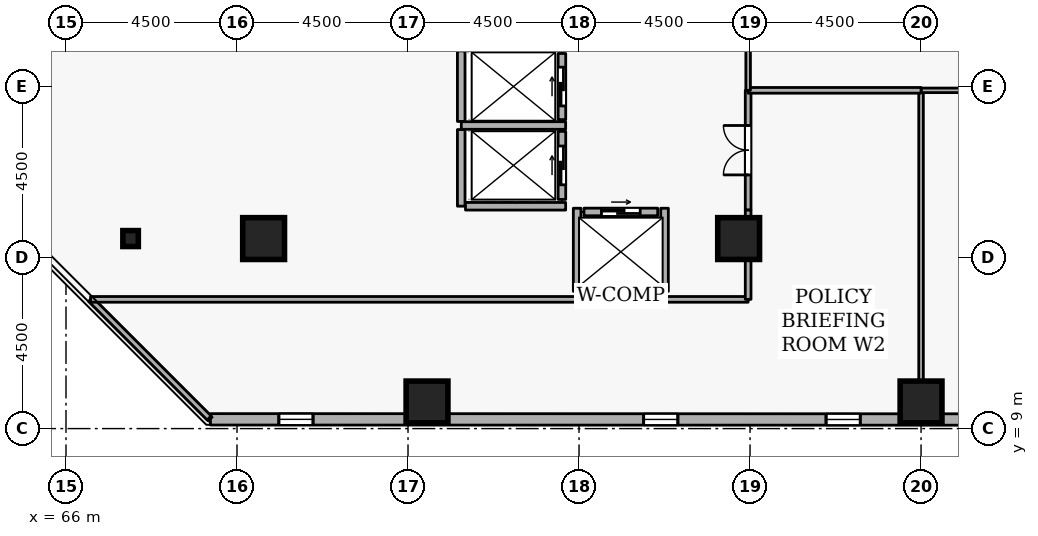
"""IFC4 building model, lengths in metres.
Left out: names, types, materials, properties, quantities, classifications, styles, units other than length and angle.
Written with IfcOpenShell. Run it as: python <this file> out.ifc"""

import sys

from ifc_helpers import new_model, si_unit, direction, frame, frame_2d, origin, origin_2d, place, context, subcontext, project, spatial, rectangle, i_section, extrude, element, fill, save


model = new_model("IFC4")
c1 = context("Model", 3, precision=1e-05, world=origin(), true_north=direction((0.0, 1.0)))
c2 = subcontext(c1, "Body", "Model", "MODEL_VIEW")
j1 = project(units=[si_unit("LENGTHUNIT", "METRE"), si_unit("PLANEANGLEUNIT", "RADIAN")], contexts=[c1])
p1 = place(None, origin())
s1 = spatial("IfcSite", under=j1, at=p1, CompositionType="ELEMENT")
p2 = place(p1, origin())
s2 = spatial("IfcBuilding", under=s1, at=p2, CompositionType="ELEMENT")
p3 = place(p2, frame((0.0, 0.0, 189.3)))
s3 = spatial("IfcBuildingStorey", under=s2, at=p3, CompositionType="ELEMENT", Elevation=189.3)
for number, where, z_axis, x_axis in (
    (1, (71.2, 14.0, 0.0), (0.0, 0.0, 1.0), (1.0, 0.0, 0.0)),
    (2, (88.5, 9.7, 0.0), (0.0, 0.0, 1.0), (1.0, 0.0, 0.0)),
    (3, (75.5, 9.7, 0.0), (0.0, 0.0, 1.0), (1.0, 0.0, 0.0)),
    (4, (83.7, 14.0, 0.0), (0.0, 0.0, 1.0), (1.0, 0.0, 0.0)),
):
    element("IfcColumn", number, at=place(p3, frame(where, z_axis=z_axis, x_axis=x_axis)), inside=s3, PredefinedType="COLUMN", context=c2, shape_type="SweptSolid", body=[
        extrude(rectangle(XDim=1.1, YDim=1.1, at=origin_2d()), origin(), (0.0, 0.0, 1.0), 3.6),
    ])
p4 = place(p3, frame((67.7, 14.0, 0.0), z_axis=(0.0, 0.0, 1.0), x_axis=(1.0, 0.0, 0.0)))
e5 = element("IfcColumn", 5, at=p4, inside=s3, PredefinedType="COLUMN", context=c2, shape_type="SweptSolid", body=[
    extrude(i_section(OverallWidth=0.407, OverallDepth=0.419, WebThickness=0.031, FlangeThickness=0.049, FilletRadius=0.015, at=origin_2d()), origin(), (0.0, 0.0, 1.0), 3.6),
])
p5 = place(p3, frame((69.801, 9.244, 0.0), z_axis=(0.0, 0.0, 1.0), x_axis=(0.999999969988, -0.000244999128, 0.0)))
e6 = element("IfcWall", 6, at=p5, inside=s3, PredefinedType="STANDARD", context=c2, shape_type="SweptSolid", body=[
    extrude(rectangle(XDim=33.881, YDim=0.3, at=frame_2d((16.94, 0.0))), origin(), (0.0, 0.0, 1.0), 2.7),
])
p6 = place(p5, frame((1.8, 0.0, 0.72)))
e7 = element("IfcOpeningElement", 7, at=p6, cuts=e6, PredefinedType="OPENING", context=c2, shape_type="SweptSolid", body=[
    extrude(rectangle(XDim=0.9, YDim=1.75, at=frame_2d((0.45, 0.875))), frame((0.0, 0.16, 0.0), z_axis=(0.0, -1.0, 0.0), x_axis=(1.0, 0.0, 0.0)), (0.0, 0.0, 1.0), 0.32),
])
p7 = place(p5, frame((11.4, 0.0, 0.72)))
e8 = element("IfcOpeningElement", 8, at=p7, cuts=e6, PredefinedType="OPENING", context=c2, shape_type="SweptSolid", body=[
    extrude(rectangle(XDim=0.9, YDim=1.75, at=frame_2d((0.45, 0.875))), frame((0.0, 0.16, 0.0), z_axis=(0.0, -1.0, 0.0), x_axis=(1.0, 0.0, 0.0)), (0.0, 0.0, 1.0), 0.32),
])
p8 = place(p5, frame((16.2, 0.0, 0.72)))
e9 = element("IfcOpeningElement", 9, at=p8, cuts=e6, PredefinedType="OPENING", context=c2, shape_type="SweptSolid", body=[
    extrude(rectangle(XDim=0.9, YDim=1.75, at=frame_2d((0.45, 0.875))), frame((0.0, 0.16, 0.0), z_axis=(0.0, -1.0, 0.0), x_axis=(1.0, 0.0, 0.0)), (0.0, 0.0, 1.0), 0.32),
])
p9 = place(p5, frame((21.0, 0.0, 0.72)))
e10 = element("IfcOpeningElement", 10, at=p9, cuts=e6, PredefinedType="OPENING", context=c2, shape_type="SweptSolid", body=[
    extrude(rectangle(XDim=0.9, YDim=1.75, at=frame_2d((0.45, 0.875))), frame((0.0, 0.16, 0.0), z_axis=(0.0, -1.0, 0.0), x_axis=(1.0, 0.0, 0.0)), (0.0, 0.0, 1.0), 0.32),
])
p10 = place(p5, frame((25.8, 0.0, 0.72)))
e11 = element("IfcOpeningElement", 11, at=p10, cuts=e6, PredefinedType="OPENING", context=c2, shape_type="SweptSolid", body=[
    extrude(rectangle(XDim=0.9, YDim=1.75, at=frame_2d((0.45, 0.875))), frame((0.0, 0.16, 0.0), z_axis=(0.0, -1.0, 0.0), x_axis=(1.0, 0.0, 0.0)), (0.0, 0.0, 1.0), 0.32),
])
p11 = place(p3, frame((79.05, 17.13, 0.0), z_axis=(0.0, 0.0, 1.0), x_axis=(0.0, 1.0, 0.0)))
e12 = element("IfcWall", 12, at=p11, inside=s3, PredefinedType="STANDARD", context=c2, shape_type="SweptSolid", body=[
    extrude(rectangle(XDim=1.74, YDim=0.2, at=frame_2d((0.87, 0.0))), origin(), (0.0, 0.0, 1.0), 3.34),
])
p12 = place(p11, frame((0.36, 0.0, 0.0)))
e13 = element("IfcOpeningElement", 13, at=p12, cuts=e12, PredefinedType="OPENING", context=c2, shape_type="SweptSolid", body=[
    extrude(rectangle(XDim=1.02, YDim=2.06, at=frame_2d((0.51, 1.03))), frame((0.0, 0.11, 0.0), z_axis=(0.0, -1.0, 0.0), x_axis=(1.0, 0.0, 0.0)), (0.0, 0.0, 1.0), 0.22),
])
p13 = place(p3, frame((79.05, 15.03, 0.0), z_axis=(0.0, 0.0, 1.0), x_axis=(0.0, 1.0, 0.0)))
e14 = element("IfcWall", 14, at=p13, inside=s3, PredefinedType="STANDARD", context=c2, shape_type="SweptSolid", body=[
    extrude(rectangle(XDim=1.79, YDim=0.2, at=frame_2d((0.895, 0.0))), origin(), (0.0, 0.0, 1.0), 3.34),
])
p14 = place(p13, frame((0.385, 0.0, 0.0)))
e15 = element("IfcOpeningElement", 15, at=p14, cuts=e14, PredefinedType="OPENING", context=c2, shape_type="SweptSolid", body=[
    extrude(rectangle(XDim=1.02, YDim=2.06, at=frame_2d((0.51, 1.03))), frame((0.0, 0.11, 0.0), z_axis=(0.0, -1.0, 0.0), x_axis=(1.0, 0.0, 0.0)), (0.0, 0.0, 1.0), 0.22),
])
p15 = place(p3, frame((79.63, 14.7, 0.0), z_axis=(0.0, 0.0, 1.0), x_axis=(1.0, 0.0, 0.0)))
e16 = element("IfcWall", 16, at=p15, inside=s3, PredefinedType="STANDARD", context=c2, shape_type="SweptSolid", body=[
    extrude(rectangle(XDim=1.94, YDim=0.2, at=frame_2d((0.97, 0.0))), origin(), (0.0, 0.0, 1.0), 3.34),
])
p16 = place(p15, frame((0.46, 0.0, 0.0)))
e17 = element("IfcOpeningElement", 17, at=p16, cuts=e16, PredefinedType="OPENING", context=c2, shape_type="SweptSolid", body=[
    extrude(rectangle(XDim=1.02, YDim=2.06, at=frame_2d((0.51, 1.03))), frame((0.0, 0.11, 0.0), z_axis=(0.0, -1.0, 0.0), x_axis=(1.0, 0.0, 0.0)), (0.0, 0.0, 1.0), 0.22),
])
p17 = place(p3, frame((76.402, 16.975, 0.0), z_axis=(0.0, 0.0, 1.0), x_axis=(1.0, 0.0, 0.0)))
e18 = element("IfcWall", 18, at=p17, inside=s3, PredefinedType="STANDARD", context=c2, shape_type="SweptSolid", body=[
    extrude(rectangle(XDim=2.746, YDim=0.2, at=frame_2d((1.373, 0.0))), origin(), (0.0, 0.0, 1.0), 3.34),
])
p18 = place(p3, frame((76.4, 14.852, 0.0), z_axis=(0.0, 0.0, 1.0), x_axis=(0.0, 1.0, 0.0)))
e19 = element("IfcWall", 19, at=p18, inside=s3, PredefinedType="STANDARD", context=c2, shape_type="SweptSolid", body=[
    extrude(rectangle(XDim=2.016, YDim=0.2, at=frame_2d((1.008, 0.0))), origin(), (0.0, 0.0, 1.0), 3.34),
])
p19 = place(p3, frame((76.4, 17.082, 0.0), z_axis=(0.0, 0.0, 1.0), x_axis=(0.0, 1.0, 0.0)))
e20 = element("IfcWall", 20, at=p19, inside=s3, PredefinedType="STANDARD", context=c2, shape_type="SweptSolid", body=[
    extrude(rectangle(XDim=1.856, YDim=0.2, at=frame_2d((0.928, 0.0))), origin(), (0.0, 0.0, 1.0), 3.34),
])
p20 = place(p3, frame((76.512, 14.85, 0.0), z_axis=(0.0, 0.0, 1.0), x_axis=(1.0, 0.0, 0.0)))
e21 = element("IfcWall", 21, at=p20, inside=s3, PredefinedType="STANDARD", context=c2, shape_type="SweptSolid", body=[
    extrude(rectangle(XDim=2.636, YDim=0.2, at=frame_2d((1.318, 0.0))), origin(), (0.0, 0.0, 1.0), 3.34),
])
p21 = place(p3, frame((79.452, 12.5, 0.0), z_axis=(0.0, 0.0, 1.0), x_axis=(1.0, 0.0, 0.0)))
e22 = element("IfcWall", 22, at=p21, inside=s3, PredefinedType="STANDARD", context=c2, shape_type="SweptSolid", body=[
    extrude(rectangle(XDim=2.296, YDim=0.2, at=frame_2d((1.148, 0.0))), origin(), (0.0, 0.0, 1.0), 3.34),
])
for number, where, z_axis, x_axis in (
    (23, (81.75, 12.612, 0.0), (0.0, 0.0, 1.0), (0.0, 1.0, 0.0)),
    (24, (79.45, 12.612, 0.0), (0.0, 0.0, 1.0), (0.0, 1.0, 0.0)),
):
    element("IfcWall", number, at=place(p3, frame(where, z_axis=z_axis, x_axis=x_axis)), inside=s3, PredefinedType="STANDARD", context=c2, shape_type="SweptSolid", body=[
        extrude(rectangle(XDim=2.186, YDim=0.2, at=frame_2d((1.093, 0.0))), origin(), (0.0, 0.0, 1.0), 3.34),
    ])
p22 = place(p3, frame((88.5, 9.28, 0.0), z_axis=(0.0, 0.0, 1.0), x_axis=(0.0, 1.0, 0.0)))
e25 = element("IfcWall", 25, at=p22, inside=s3, PredefinedType="PARTITIONING", context=c2, shape_type="SweptSolid", body=[
    extrude(rectangle(XDim=8.62, YDim=0.12, at=frame_2d((4.31, 0.0))), origin(), (0.0, 0.0, 1.0), 2.878),
])
p23 = place(p3, frame((88.5, 17.9, 0.0), z_axis=(0.0, 0.0, 1.0), x_axis=(1.0, 0.0, 0.0)))
e26 = element("IfcWall", 26, at=p23, inside=s3, PredefinedType="PARTITIONING", context=c2, shape_type="SweptSolid", body=[
    extrude(rectangle(XDim=4.55, YDim=0.12, at=frame_2d((2.275, 0.0))), origin(), (0.0, 0.0, 1.0), 3.34),
])
p24 = place(p3, frame((83.95, 14.75, 0.0), z_axis=(0.0, 0.0, 1.0), x_axis=(0.0, 1.0, 0.0)))
e27 = element("IfcWall", 27, at=p24, inside=s3, PredefinedType="PARTITIONING", context=c2, shape_type="SweptSolid", body=[
    extrude(rectangle(XDim=3.15, YDim=0.15, at=frame_2d((1.575, 0.0))), origin(), (0.0, 0.0, 1.0), 3.34),
])
p25 = place(p24, frame((0.925, 0.0, 0.0)))
e28 = element("IfcOpeningElement", 28, at=p25, cuts=e27, PredefinedType="OPENING", context=c2, shape_type="SweptSolid", body=[
    extrude(rectangle(XDim=1.3, YDim=2.12, at=frame_2d((0.65, 1.06))), frame((0.0, 0.085, 0.0), z_axis=(0.0, -1.0, 0.0), x_axis=(1.0, 0.0, 0.0)), (0.0, 0.0, 1.0), 0.17),
])
p26 = place(p3, frame((83.95, 17.9, 0.0), z_axis=(0.0, 0.0, 1.0), x_axis=(1.0, 0.0, 0.0)))
e29 = element("IfcWall", 29, at=p26, inside=s3, PredefinedType="PARTITIONING", context=c2, shape_type="SweptSolid", body=[
    extrude(rectangle(XDim=4.55, YDim=0.15, at=frame_2d((2.275, 0.0))), origin(), (0.0, 0.0, 1.0), 3.34),
])
p27 = place(p3, frame((69.767, 9.28, 0.0), z_axis=(0.0, 0.0, 1.0), x_axis=(-0.707134446312, 0.707079114978, 0.0)))
e30 = element("IfcWall", 30, at=p27, inside=s3, PredefinedType="PARTITIONING", context=c2, shape_type="SweptSolid", body=[
    extrude(rectangle(XDim=4.412, YDim=0.15, at=frame_2d((2.206, 0.0))), origin(), (0.0, 0.0, 1.0), 3.34),
])
p28 = place(p3, frame((66.646, 12.4, 0.0), z_axis=(0.0, 0.0, 1.0), x_axis=(1.0, 0.0, 0.0)))
e31 = element("IfcWall", 31, at=p28, inside=s3, PredefinedType="PARTITIONING", context=c2, shape_type="SweptSolid", body=[
    extrude(rectangle(XDim=12.805, YDim=0.15, at=frame_2d((6.403, 0.0))), origin(), (0.0, 0.0, 1.0), 3.34),
])
p29 = place(p3, frame((81.748, 12.4, 0.0), z_axis=(0.0, 0.0, 1.0), x_axis=(1.0, 0.0, 0.0)))
e32 = element("IfcWall", 32, at=p29, inside=s3, PredefinedType="PARTITIONING", context=c2, shape_type="SweptSolid", body=[
    extrude(rectangle(XDim=2.202, YDim=0.15, at=frame_2d((1.101, 0.0))), origin(), (0.0, 0.0, 1.0), 3.34),
])
p30 = place(p3, frame((83.95, 12.4, 0.0), z_axis=(0.0, 0.0, 1.0), x_axis=(0.0, 1.0, 0.0)))
e33 = element("IfcWall", 33, at=p30, inside=s3, PredefinedType="PARTITIONING", context=c2, shape_type="SweptSolid", body=[
    extrude(rectangle(XDim=2.35, YDim=0.15, at=frame_2d((1.175, 0.0))), origin(), (0.0, 0.0, 1.0), 3.34),
])
p31 = place(p3, frame((83.95, 17.9, 0.0), z_axis=(0.0, 0.0, 1.0), x_axis=(0.0, 1.0, 0.0)))
e34 = element("IfcWall", 34, at=p31, inside=s3, PredefinedType="PARTITIONING", context=c2, shape_type="SweptSolid", body=[
    extrude(rectangle(XDim=4.5, YDim=0.12, at=frame_2d((2.25, 0.0))), origin(), (0.0, 0.0, 1.0), 3.34),
])
p32 = place(p31, frame((1.775, 0.0, 0.0)))
e35 = element("IfcOpeningElement", 35, at=p32, cuts=e34, PredefinedType="OPENING", context=c2, shape_type="SweptSolid", body=[
    extrude(rectangle(XDim=0.95, YDim=2.1, at=frame_2d((0.475, 1.05))), frame((0.0, 0.07, 0.0), z_axis=(0.0, -1.0, 0.0), x_axis=(1.0, 0.0, 0.0)), (0.0, 0.0, 1.0), 0.14),
])
p33 = place(p6, origin())
e36 = element("IfcWindow", 36, at=p33, inside=s3, PartitioningType="SINGLE_PANEL", PredefinedType="WINDOW", context=c2, shape_type="SweptSolid", body=[
    extrude(rectangle(XDim=0.9, YDim=1.75, at=frame_2d((0.45, 0.875))), frame((0.0, 0.03, 0.0), z_axis=(0.0, -1.0, 0.0), x_axis=(1.0, 0.0, 0.0)), (0.0, 0.0, 1.0), 0.06),
])
fill(e7, e36)
p34 = place(p7, origin())
e37 = element("IfcWindow", 37, at=p34, inside=s3, PartitioningType="SINGLE_PANEL", PredefinedType="WINDOW", context=c2, shape_type="SweptSolid", body=[
    extrude(rectangle(XDim=0.9, YDim=1.75, at=frame_2d((0.45, 0.875))), frame((0.0, 0.03, 0.0), z_axis=(0.0, -1.0, 0.0), x_axis=(1.0, 0.0, 0.0)), (0.0, 0.0, 1.0), 0.06),
])
fill(e8, e37)
p35 = place(p8, origin())
e38 = element("IfcWindow", 38, at=p35, inside=s3, PartitioningType="SINGLE_PANEL", PredefinedType="WINDOW", context=c2, shape_type="SweptSolid", body=[
    extrude(rectangle(XDim=0.9, YDim=1.75, at=frame_2d((0.45, 0.875))), frame((0.0, 0.03, 0.0), z_axis=(0.0, -1.0, 0.0), x_axis=(1.0, 0.0, 0.0)), (0.0, 0.0, 1.0), 0.06),
])
fill(e9, e38)
p36 = place(p12, origin())
e39 = element("IfcDoor", 39, at=p36, inside=s3, OperationType="SLIDING_TO_LEFT", PredefinedType="DOOR", context=c2, shape_type="SweptSolid", body=[
    extrude(rectangle(XDim=1.02, YDim=2.06, at=frame_2d((0.51, 1.03))), frame((0.0, 0.025, 0.0), z_axis=(0.0, -1.0, 0.0), x_axis=(1.0, 0.0, 0.0)), (0.0, 0.0, 1.0), 0.05),
])
fill(e13, e39)
p37 = place(p14, origin())
e40 = element("IfcDoor", 40, at=p37, inside=s3, OperationType="SLIDING_TO_LEFT", PredefinedType="DOOR", context=c2, shape_type="SweptSolid", body=[
    extrude(rectangle(XDim=1.02, YDim=2.06, at=frame_2d((0.51, 1.03))), frame((0.0, 0.025, 0.0), z_axis=(0.0, -1.0, 0.0), x_axis=(1.0, 0.0, 0.0)), (0.0, 0.0, 1.0), 0.05),
])
fill(e15, e40)
p38 = place(p16, origin())
e41 = element("IfcDoor", 41, at=p38, inside=s3, OperationType="SLIDING_TO_LEFT", PredefinedType="DOOR", context=c2, shape_type="SweptSolid", body=[
    extrude(rectangle(XDim=1.02, YDim=2.06, at=frame_2d((0.51, 1.03))), frame((0.0, 0.025, 0.0), z_axis=(0.0, -1.0, 0.0), x_axis=(1.0, 0.0, 0.0)), (0.0, 0.0, 1.0), 0.05),
])
fill(e17, e41)
p39 = place(p25, origin())
e42 = element("IfcDoor", 42, at=p39, inside=s3, OperationType="DOUBLE_DOOR_SINGLE_SWING", PredefinedType="DOOR", context=c2, shape_type="SweptSolid", body=[
    extrude(rectangle(XDim=1.3, YDim=2.12, at=frame_2d((0.65, 1.06))), frame((0.0, 0.025, 0.0), z_axis=(0.0, -1.0, 0.0), x_axis=(1.0, 0.0, 0.0)), (0.0, 0.0, 1.0), 0.05),
])
fill(e28, e42)
save(model, sys.argv[1])
